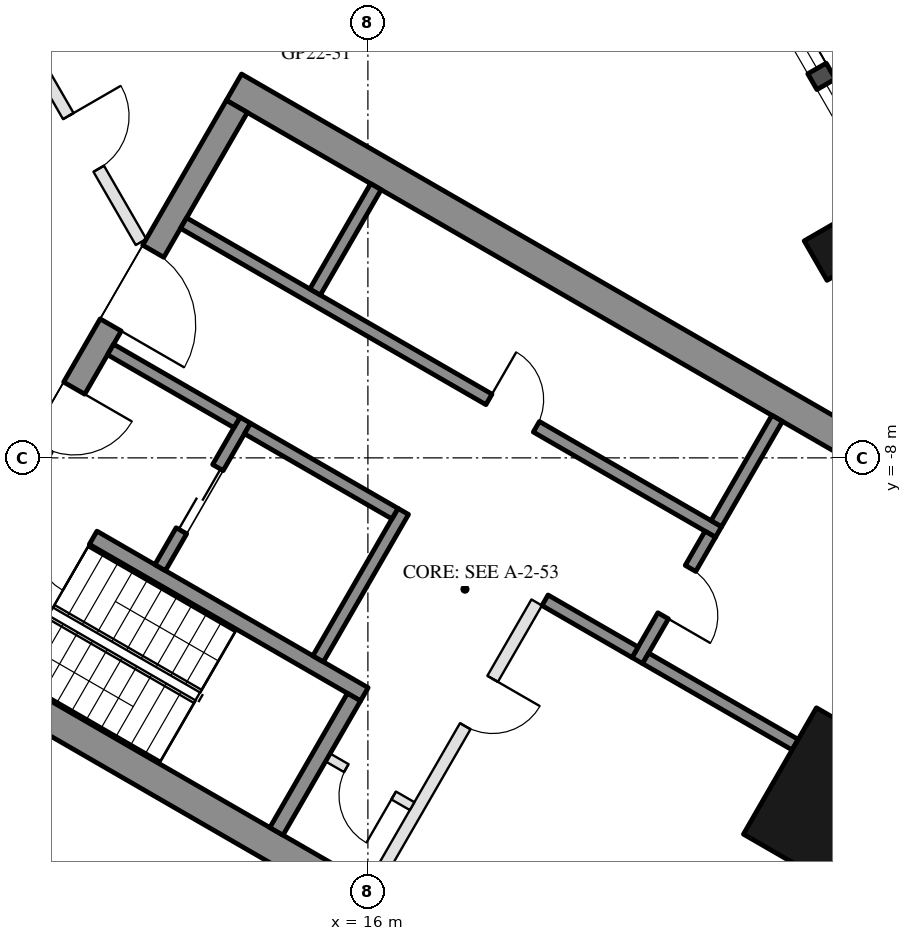
"""IFC4 building model, lengths in metres.
Left out: names, types, materials, properties, quantities, classifications, styles, units other than length and angle.
Written with IfcOpenShell. Run it as: python <this file> out.ifc"""

import sys

from ifc_helpers import new_model, si_unit, direction, frame, frame_2d, origin, origin_2d, place, context, subcontext, project, spatial, rectangle, hollow_rectangle, extrude, element, fill, save


model = new_model("IFC4")
c1 = context("Model", 3, precision=1e-05, world=origin(), true_north=direction((0.0, 1.0)))
c2 = subcontext(c1, "Body", "Model", "MODEL_VIEW")
j1 = project(units=[si_unit("LENGTHUNIT", "METRE"), si_unit("PLANEANGLEUNIT", "RADIAN")], contexts=[c1])
p1 = place(None, origin())
s1 = spatial("IfcSite", under=j1, at=p1, CompositionType="ELEMENT")
p2 = place(p1, origin())
s2 = spatial("IfcBuilding", under=s1, at=p2, CompositionType="ELEMENT")
p3 = place(p2, frame((0.0, 0.0, 228.0)))
s3 = spatial("IfcBuildingStorey", under=s2, at=p3, CompositionType="ELEMENT", Elevation=228.0)
p4 = place(p3, frame((23.688, -4.568, 0.0), z_axis=(0.0, 0.0, 1.0), x_axis=(-0.5, 0.866025403784, 0.0)))
e1 = element("IfcColumn", 1, at=p4, inside=s3, PredefinedType="COLUMN", context=c2, shape_type="SweptSolid", body=[
    extrude(hollow_rectangle(XDim=0.75, YDim=0.75, WallThickness=0.035, at=origin_2d()), origin(), (0.0, 0.0, 1.0), 3.7),
])
p5 = place(p3, frame((23.729, -13.7, 0.0), z_axis=(0.0, 0.0, 1.0), x_axis=(0.5, 0.866025403784, 0.0)))
e2 = element("IfcColumn", 2, at=p5, inside=s3, PredefinedType="COLUMN", context=c2, shape_type="SweptSolid", body=[
    extrude(hollow_rectangle(XDim=2.4, YDim=2.2, WallThickness=0.06, at=origin_2d()), origin(), (0.0, 0.0, 1.0), 3.7),
])
p6 = place(p3, frame((23.427, -16.792, 0.0), z_axis=(0.0, 0.0, 1.0), x_axis=(0.500018773155, 0.866014564827, 0.0)))
e3 = element("IfcWall", 3, at=p6, inside=s3, PredefinedType="SOLIDWALL", context=c2, shape_type="SweptSolid", body=[
    extrude(rectangle(XDim=5.658, YDim=0.35, at=frame_2d((2.829, 0.0))), origin(), (0.0, 0.0, 1.0), 3.45),
])
p7 = place(p3, frame((26.257, -6.567, 0.0), z_axis=(0.0, 0.0, 1.0), x_axis=(-0.500023526245, 0.866011820475, 0.0)))
e4 = element("IfcWall", 4, at=p7, inside=s3, PredefinedType="SOLIDWALL", context=c2, shape_type="SweptSolid", body=[
    extrude(rectangle(XDim=11.816, YDim=0.35, at=frame_2d((5.908, 0.0))), origin(), (0.0, 0.0, 1.0), 3.45),
])
p8 = place(p7, frame((0.38, 0.0, 0.3)))
e5 = element("IfcOpeningElement", 5, at=p8, cuts=e4, PredefinedType="OPENING", context=c2, shape_type="SweptSolid", body=[
    extrude(rectangle(XDim=1.9, YDim=2.65, at=frame_2d((0.95, 1.325))), frame((0.0, 0.185, 0.0), z_axis=(0.0, -1.0, 0.0), x_axis=(1.0, 0.0, 0.0)), (0.0, 0.0, 1.0), 0.37),
])
p9 = place(p7, frame((7.791, 0.0, 0.0)))
e6 = element("IfcOpeningElement", 6, at=p9, cuts=e4, PredefinedType="OPENING", context=c2, shape_type="SweptSolid", body=[
    extrude(rectangle(XDim=2.4, YDim=2.4, at=frame_2d((1.2, 1.2))), frame((0.0, 0.185, 0.0), z_axis=(0.0, -1.0, 0.0), x_axis=(1.0, 0.0, 0.0)), (0.0, 0.0, 1.0), 0.37),
])
p10 = place(p7, frame((3.741, 0.0, 0.3)))
e7 = element("IfcOpeningElement", 7, at=p10, cuts=e4, PredefinedType="OPENING", context=c2, shape_type="SweptSolid", body=[
    extrude(rectangle(XDim=1.7, YDim=2.65, at=frame_2d((0.85, 1.325))), frame((0.0, 0.185, 0.0), z_axis=(0.0, -1.0, 0.0), x_axis=(1.0, 0.0, 0.0)), (0.0, 0.0, 1.0), 0.37),
])
p11 = place(p7, frame((5.741, 0.0, 0.3)))
e8 = element("IfcOpeningElement", 8, at=p11, cuts=e4, PredefinedType="OPENING", context=c2, shape_type="SweptSolid", body=[
    extrude(rectangle(XDim=1.7, YDim=2.65, at=frame_2d((0.85, 1.325))), frame((0.0, 0.185, 0.0), z_axis=(0.0, -1.0, 0.0), x_axis=(1.0, 0.0, 0.0)), (0.0, 0.0, 1.0), 0.37),
])
for number, where, z_axis, x_axis in (
    (9, (8.547, -10.997, 0.0), (0.0, 0.0, 1.0), (0.866, -0.5, 0.0)),
    (10, (13.797, -1.903, 0.0), (0.0, 0.0, 1.0), (0.866, -0.5, 0.0)),
):
    element("IfcWall", number, at=place(p3, frame(where, z_axis=z_axis, x_axis=x_axis)), inside=s3, PredefinedType="SHEAR", context=c2, shape_type="SweptSolid", body=[
        extrude(rectangle(XDim=14.837, YDim=0.5, at=frame_2d((7.418, 0.0))), origin(), (0.0, 0.0, 1.0), 3.45),
    ])
p12 = place(p3, frame((8.845, -10.88, 0.0), z_axis=(0.0, 0.0, 1.0), x_axis=(0.500004234368, 0.866022959057, 0.0)))
e11 = element("IfcWall", 11, at=p12, inside=s3, PredefinedType="SHEAR", context=c2, shape_type="SweptSolid", body=[
    extrude(rectangle(XDim=10.0, YDim=0.4, at=frame_2d((5.0, 0.0))), origin(), (0.0, 0.0, 1.0), 3.45),
])
p13 = place(p12, frame((3.55, 0.0, 0.0)))
e12 = element("IfcOpeningElement", 12, at=p13, cuts=e11, PredefinedType="OPENING", context=c2, shape_type="SweptSolid", body=[
    extrude(rectangle(XDim=1.1, YDim=2.1, at=frame_2d((0.55, 1.05))), frame((0.0, 0.21, 0.0), z_axis=(0.0, -1.0, 0.0), x_axis=(1.0, 0.0, 0.0)), (0.0, 0.0, 1.0), 0.42),
])
p14 = place(p12, frame((5.85, 0.0, 0.0)))
e13 = element("IfcOpeningElement", 13, at=p14, cuts=e11, PredefinedType="OPENING", context=c2, shape_type="SweptSolid", body=[
    extrude(rectangle(XDim=1.4, YDim=2.1, at=frame_2d((0.7, 1.05))), frame((0.0, 0.21, 0.0), z_axis=(0.0, -1.0, 0.0), x_axis=(1.0, 0.0, 0.0)), (0.0, 0.0, 1.0), 0.42),
])
p15 = place(p3, frame((10.356, -8.664, 0.0), z_axis=(0.0, 0.0, 1.0), x_axis=(0.866028629588, -0.499994412703, 0.0)))
e14 = element("IfcWall", 14, at=p15, inside=s3, PredefinedType="SHEAR", context=c2, shape_type="SweptSolid", body=[
    extrude(rectangle(XDim=6.45, YDim=0.25, at=frame_2d((3.225, 0.0))), origin(), (0.0, 0.0, 1.0), 3.45),
])
p16 = place(p15, frame((0.3, 0.0, 0.0)))
e15 = element("IfcOpeningElement", 15, at=p16, cuts=e14, PredefinedType="OPENING", context=c2, shape_type="SweptSolid", body=[
    extrude(rectangle(XDim=1.0, YDim=2.1, at=frame_2d((0.5, 1.05))), frame((0.0, 0.135, 0.0), z_axis=(0.0, -1.0, 0.0), x_axis=(1.0, 0.0, 0.0)), (0.0, 0.0, 1.0), 0.27),
])
p17 = place(p3, frame((14.496, -14.143, 0.0), z_axis=(0.0, 0.0, 1.0), x_axis=(0.500062241894, 0.865989465428, 0.0)))
e16 = element("IfcWall", 16, at=p17, inside=s3, PredefinedType="SHEAR", context=c2, shape_type="SweptSolid", body=[
    extrude(rectangle(XDim=2.55, YDim=0.25, at=frame_2d((1.275, 0.0))), origin(), (0.0, 0.0, 1.0), 3.45),
])
p18 = place(p3, frame((15.181, -11.305, 0.0), z_axis=(0.0, 0.0, 1.0), x_axis=(0.49994636267, 0.866056369097, 0.0)))
e17 = element("IfcWall", 17, at=p18, inside=s3, PredefinedType="SHEAR", context=c2, shape_type="SweptSolid", body=[
    extrude(rectangle(XDim=2.8, YDim=0.2, at=frame_2d((1.4, 0.0))), origin(), (0.0, 0.0, 1.0), 3.45),
])
p19 = place(p3, frame((12.583, -9.805, 0.0), z_axis=(0.0, 0.0, 1.0), x_axis=(0.49994636267, 0.866056369097, 0.0)))
e18 = element("IfcWall", 18, at=p19, inside=s3, PredefinedType="SHEAR", context=c2, shape_type="SweptSolid", body=[
    extrude(rectangle(XDim=2.8, YDim=0.2, at=frame_2d((1.4, 0.0))), origin(), (0.0, 0.0, 1.0), 3.45),
])
p20 = place(p19, frame((0.7, 0.0, 0.0)))
e19 = element("IfcOpeningElement", 19, at=p20, cuts=e18, PredefinedType="OPENING", context=c2, shape_type="SweptSolid", body=[
    extrude(rectangle(XDim=1.2, YDim=2.1, at=frame_2d((0.6, 1.05))), frame((0.0, 0.11, 0.0), z_axis=(0.0, -1.0, 0.0), x_axis=(1.0, 0.0, 0.0)), (0.0, 0.0, 1.0), 0.22),
])
p21 = place(p3, frame((11.768, -6.217, 0.0), z_axis=(0.0, 0.0, 1.0), x_axis=(0.866050077142, -0.499957262057, 0.0)))
e20 = element("IfcWall", 20, at=p21, inside=s3, PredefinedType="SHEAR", context=c2, shape_type="SweptSolid", body=[
    extrude(rectangle(XDim=2.4, YDim=0.2, at=frame_2d((1.2, 0.0))), origin(), (0.0, 0.0, 1.0), 3.45),
])
p22 = place(p3, frame((14.02, -7.517, 0.0), z_axis=(0.0, 0.0, 1.0), x_axis=(0.866034573852, -0.49998411664, 0.0)))
e21 = element("IfcWall", 21, at=p22, inside=s3, PredefinedType="SHEAR", context=c2, shape_type="SweptSolid", body=[
    extrude(rectangle(XDim=2.8, YDim=0.2, at=frame_2d((1.4, 0.0))), origin(), (0.0, 0.0, 1.0), 3.45),
])
p23 = place(p3, frame((12.968, -4.138, 0.0), z_axis=(0.0, 0.0, 1.0), x_axis=(0.866028328073, -0.49999493495, 0.0)))
e22 = element("IfcWall", 22, at=p23, inside=s3, PredefinedType="SHEAR", context=c2, shape_type="SweptSolid", body=[
    extrude(rectangle(XDim=10.16, YDim=0.2, at=frame_2d((5.08, 0.0))), origin(), (0.0, 0.0, 1.0), 3.45),
])
p24 = place(p23, frame((5.8, 0.0, 0.0)))
e23 = element("IfcOpeningElement", 23, at=p24, cuts=e22, PredefinedType="OPENING", context=c2, shape_type="SweptSolid", body=[
    extrude(rectangle(XDim=0.9, YDim=2.1, at=frame_2d((0.45, 1.05))), frame((0.0, 0.11, 0.0), z_axis=(0.0, -1.0, 0.0), x_axis=(1.0, 0.0, 0.0)), (0.0, 0.0, 1.0), 0.22),
])
p25 = place(p3, frame((20.43, -11.333, 0.0), z_axis=(0.0, 0.0, 1.0), x_axis=(0.500001309137, 0.866024647952, 0.0)))
e24 = element("IfcWall", 24, at=p25, inside=s3, PredefinedType="SHEAR", context=c2, shape_type="SweptSolid", body=[
    extrude(rectangle(XDim=2.4, YDim=0.2, at=frame_2d((1.2, 0.0))), origin(), (0.0, 0.0, 1.0), 3.45),
])
p26 = place(p25, frame((0.85, 0.0, 0.0)))
e25 = element("IfcOpeningElement", 25, at=p26, cuts=e24, PredefinedType="OPENING", context=c2, shape_type="SweptSolid", body=[
    extrude(rectangle(XDim=0.9, YDim=2.1, at=frame_2d((0.45, 1.05))), frame((0.0, 0.11, 0.0), z_axis=(0.0, -1.0, 0.0), x_axis=(1.0, 0.0, 0.0)), (0.0, 0.0, 1.0), 0.22),
])
p27 = place(p3, frame((18.913, -10.342, 0.0), z_axis=(0.0, 0.0, 1.0), x_axis=(0.866038183914, -0.499977863513, 0.0)))
e26 = element("IfcWall", 26, at=p27, inside=s3, PredefinedType="SHEAR", context=c2, shape_type="SweptSolid", body=[
    extrude(rectangle(XDim=1.71, YDim=0.2, at=frame_2d((0.855, 0.0))), origin(), (0.0, 0.0, 1.0), 3.45),
])
for number, where, z_axis, x_axis in (
    (27, (15.131, -5.272, 0.0), (0.0, 0.0, 1.0), (0.5, 0.866, 0.0)),
    (28, (21.73, -9.082, 0.0), (0.0, 0.0, 1.0), (0.5, 0.866, 0.0)),
):
    element("IfcWall", number, at=place(p3, frame(where, z_axis=z_axis, x_axis=x_axis)), inside=s3, PredefinedType="SHEAR", context=c2, shape_type="SweptSolid", body=[
        extrude(rectangle(XDim=2.0, YDim=0.2, at=frame_2d((1.0, 0.0))), origin(), (0.0, 0.0, 1.0), 3.45),
    ])
p28 = place(p3, frame((20.567, -11.297, 0.0), z_axis=(0.0, 0.0, 1.0), x_axis=(0.866055327414, -0.49994816717, 0.0)))
e29 = element("IfcWall", 29, at=p28, inside=s3, PredefinedType="SHEAR", context=c2, shape_type="SweptSolid", body=[
    extrude(rectangle(XDim=2.84, YDim=0.2, at=frame_2d((1.42, 0.0))), origin(), (0.0, 0.0, 1.0), 3.45),
])
p29 = place(p3, frame((16.076, -15.055, 0.0), z_axis=(0.0, 0.0, 1.0), x_axis=(0.499995103361, 0.866028230842, 0.0)))
e30 = element("IfcWall", 30, at=p29, inside=s3, PredefinedType="PARTITIONING", context=c2, shape_type="SweptSolid", body=[
    extrude(rectangle(XDim=5.4, YDim=0.2, at=frame_2d((2.7, 0.0))), origin(), (0.0, 0.0, 1.0), 3.45),
])
p30 = place(p29, frame((3.05, 0.0, 0.0)))
e31 = element("IfcOpeningElement", 31, at=p30, cuts=e30, PredefinedType="OPENING", context=c2, shape_type="SweptSolid", body=[
    extrude(rectangle(XDim=0.9, YDim=2.1, at=frame_2d((0.45, 1.05))), frame((0.0, 0.11, 0.0), z_axis=(0.0, -1.0, 0.0), x_axis=(1.0, 0.0, 0.0)), (0.0, 0.0, 1.0), 0.22),
])
p31 = place(p3, frame((15.342, -12.928, 0.0), z_axis=(0.0, 0.0, 1.0), x_axis=(0.865989903783, -0.500061482766, 0.0)))
e32 = element("IfcWall", 32, at=p31, inside=s3, PredefinedType="PARTITIONING", context=c2, shape_type="SweptSolid", body=[
    extrude(rectangle(XDim=1.6, YDim=0.15, at=frame_2d((0.8, 0.0))), origin(), (0.0, 0.0, 1.0), 3.45),
])
p32 = place(p31, frame((0.35, 0.0, 0.0)))
e33 = element("IfcOpeningElement", 33, at=p32, cuts=e32, PredefinedType="OPENING", context=c2, shape_type="SweptSolid", body=[
    extrude(rectangle(XDim=0.9, YDim=2.1, at=frame_2d((0.45, 1.05))), frame((0.0, 0.085, 0.0), z_axis=(0.0, -1.0, 0.0), x_axis=(1.0, 0.0, 0.0)), (0.0, 0.0, 1.0), 0.17),
])
p33 = place(p3, frame((10.377, -1.174, 0.0), z_axis=(0.0, 0.0, 1.0), x_axis=(0.500033471514, -0.866006078134, 0.0)))
e34 = element("IfcWall", 34, at=p33, inside=s3, PredefinedType="PARTITIONING", context=c2, shape_type="SweptSolid", body=[
    extrude(rectangle(XDim=3.782, YDim=0.2, at=frame_2d((1.891, 0.0))), origin(), (0.0, 0.0, 1.0), 2.76),
])
p34 = place(p33, frame((1.391, 0.0, 0.0)))
e35 = element("IfcOpeningElement", 35, at=p34, cuts=e34, PredefinedType="OPENING", context=c2, shape_type="SweptSolid", body=[
    extrude(rectangle(XDim=1.0, YDim=2.1, at=frame_2d((0.5, 1.05))), frame((0.0, 0.11, 0.0), z_axis=(0.0, -1.0, 0.0), x_axis=(1.0, 0.0, 0.0)), (0.0, 0.0, 1.0), 0.22),
])
p35 = place(p10, origin())
e36 = element("IfcWindow", 36, at=p35, inside=s3, PartitioningType="SINGLE_PANEL", PredefinedType="WINDOW", context=c2, shape_type="SweptSolid", body=[
    extrude(rectangle(XDim=1.7, YDim=2.65, at=frame_2d((0.85, 1.325))), frame((0.0, 0.03, 0.0), z_axis=(0.0, -1.0, 0.0), x_axis=(1.0, 0.0, 0.0)), (0.0, 0.0, 1.0), 0.06),
])
fill(e7, e36)
p36 = place(p11, origin())
e37 = element("IfcWindow", 37, at=p36, inside=s3, PartitioningType="SINGLE_PANEL", PredefinedType="WINDOW", context=c2, shape_type="SweptSolid", body=[
    extrude(rectangle(XDim=1.7, YDim=2.65, at=frame_2d((0.85, 1.325))), frame((0.0, 0.03, 0.0), z_axis=(0.0, -1.0, 0.0), x_axis=(1.0, 0.0, 0.0)), (0.0, 0.0, 1.0), 0.06),
])
fill(e8, e37)
p37 = place(p20, origin())
e38 = element("IfcDoor", 38, at=p37, inside=s3, OperationType="DOUBLE_DOOR_SLIDING", PredefinedType="DOOR", context=c2, shape_type="SweptSolid", body=[
    extrude(rectangle(XDim=1.2, YDim=2.1, at=frame_2d((0.6, 1.05))), frame((0.0, 0.025, 0.0), z_axis=(0.0, -1.0, 0.0), x_axis=(1.0, 0.0, 0.0)), (0.0, 0.0, 1.0), 0.05),
])
fill(e19, e38)
p38 = place(p32, frame((0.9, 0.0, 0.0), z_axis=(0.0, 0.0, 1.0), x_axis=(-1.0, 0.0, 0.0)))
e39 = element("IfcDoor", 39, at=p38, inside=s3, OperationType="SINGLE_SWING_LEFT", PredefinedType="DOOR", context=c2, shape_type="SweptSolid", body=[
    extrude(rectangle(XDim=0.9, YDim=2.1, at=frame_2d((0.45, 1.05))), frame((0.0, 0.025, 0.0), z_axis=(0.0, -1.0, 0.0), x_axis=(1.0, 0.0, 0.0)), (0.0, 0.0, 1.0), 0.05),
])
fill(e33, e39)
p39 = place(p24, origin())
e40 = element("IfcDoor", 40, at=p39, inside=s3, OperationType="SINGLE_SWING_LEFT", PredefinedType="DOOR", context=c2, shape_type="SweptSolid", body=[
    extrude(rectangle(XDim=0.9, YDim=2.1, at=frame_2d((0.45, 1.05))), frame((0.0, 0.025, 0.0), z_axis=(0.0, -1.0, 0.0), x_axis=(1.0, 0.0, 0.0)), (0.0, 0.0, 1.0), 0.05),
])
fill(e23, e40)
p40 = place(p26, frame((0.9, 0.0, 0.0), z_axis=(0.0, 0.0, 1.0), x_axis=(-1.0, 0.0, 0.0)))
e41 = element("IfcDoor", 41, at=p40, inside=s3, OperationType="SINGLE_SWING_RIGHT", PredefinedType="DOOR", context=c2, shape_type="SweptSolid", body=[
    extrude(rectangle(XDim=0.9, YDim=2.1, at=frame_2d((0.45, 1.05))), frame((0.0, 0.025, 0.0), z_axis=(0.0, -1.0, 0.0), x_axis=(1.0, 0.0, 0.0)), (0.0, 0.0, 1.0), 0.05),
])
fill(e25, e41)
p41 = place(p30, frame((0.9, 0.0, 0.0), z_axis=(0.0, 0.0, 1.0), x_axis=(-1.0, 0.0, 0.0)))
e42 = element("IfcDoor", 42, at=p41, inside=s3, OperationType="SINGLE_SWING_LEFT", PredefinedType="DOOR", context=c2, shape_type="SweptSolid", body=[
    extrude(rectangle(XDim=0.9, YDim=2.1, at=frame_2d((0.45, 1.05))), frame((0.0, 0.025, 0.0), z_axis=(0.0, -1.0, 0.0), x_axis=(1.0, 0.0, 0.0)), (0.0, 0.0, 1.0), 0.05),
])
fill(e31, e42)
p42 = place(p13, frame((1.1, 0.0, 0.0), z_axis=(0.0, 0.0, 1.0), x_axis=(-1.0, 0.0, 0.0)))
e43 = element("IfcDoor", 43, at=p42, inside=s3, OperationType="SINGLE_SWING_LEFT", PredefinedType="DOOR", context=c2, shape_type="SweptSolid", body=[
    extrude(rectangle(XDim=1.1, YDim=2.1, at=frame_2d((0.55, 1.05))), frame((0.0, 0.025, 0.0), z_axis=(0.0, -1.0, 0.0), x_axis=(1.0, 0.0, 0.0)), (0.0, 0.0, 1.0), 0.05),
])
fill(e12, e43)
p43 = place(p14, frame((1.4, 0.0, 0.0), z_axis=(0.0, 0.0, 1.0), x_axis=(-1.0, 0.0, 0.0)))
e44 = element("IfcDoor", 44, at=p43, inside=s3, OperationType="DOUBLE_DOOR_SINGLE_SWING", PredefinedType="DOOR", context=c2, shape_type="SweptSolid", body=[
    extrude(rectangle(XDim=1.4, YDim=2.1, at=frame_2d((0.7, 1.05))), frame((0.0, 0.025, 0.0), z_axis=(0.0, -1.0, 0.0), x_axis=(1.0, 0.0, 0.0)), (0.0, 0.0, 1.0), 0.05),
])
fill(e13, e44)
p44 = place(p16, frame((1.0, 0.0, 0.0), z_axis=(0.0, 0.0, 1.0), x_axis=(-1.0, 0.0, 0.0)))
e45 = element("IfcDoor", 45, at=p44, inside=s3, OperationType="SINGLE_SWING_LEFT", PredefinedType="DOOR", context=c2, shape_type="SweptSolid", body=[
    extrude(rectangle(XDim=1.0, YDim=2.1, at=frame_2d((0.5, 1.05))), frame((0.0, 0.025, 0.0), z_axis=(0.0, -1.0, 0.0), x_axis=(1.0, 0.0, 0.0)), (0.0, 0.0, 1.0), 0.05),
])
fill(e15, e45)
p45 = place(p34, origin())
e46 = element("IfcDoor", 46, at=p45, inside=s3, OperationType="SINGLE_SWING_LEFT", PredefinedType="DOOR", context=c2, shape_type="SweptSolid", body=[
    extrude(rectangle(XDim=1.0, YDim=2.1, at=frame_2d((0.5, 1.05))), frame((0.0, 0.025, 0.0), z_axis=(0.0, -1.0, 0.0), x_axis=(1.0, 0.0, 0.0)), (0.0, 0.0, 1.0), 0.05),
])
fill(e35, e46)
save(model, sys.argv[1])
